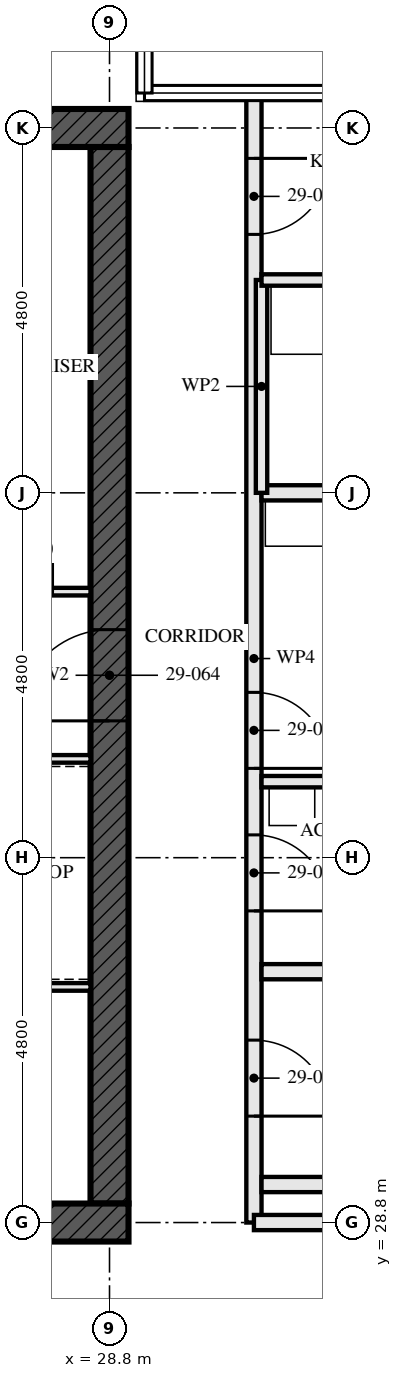
"""IFC4 building model, lengths in metres.
Left out: names, types, materials, properties, quantities, classifications, styles, units other than length and angle.
Written with IfcOpenShell. Run it as: python <this file> out.ifc"""

import sys

from ifc_helpers import new_model, si_unit, direction, frame, frame_2d, origin, place, context, subcontext, project, spatial, rectangle, extrude, element, fill, save


model = new_model("IFC4")
c1 = context("Model", 3, precision=1e-05, world=origin(), true_north=direction((0.0, 1.0)))
c2 = subcontext(c1, "Body", "Model", "MODEL_VIEW")
j1 = project(units=[si_unit("LENGTHUNIT", "METRE"), si_unit("PLANEANGLEUNIT", "RADIAN")], contexts=[c1])
p1 = place(None, origin())
s1 = spatial("IfcSite", under=j1, at=p1, CompositionType="ELEMENT")
p2 = place(p1, origin())
s2 = spatial("IfcBuilding", under=s1, at=p2, CompositionType="ELEMENT")
p3 = place(p2, frame((0.0, 0.0, 108.5)))
s3 = spatial("IfcBuildingStorey", under=s2, at=p3, CompositionType="ELEMENT", Elevation=108.5)
p4 = place(p3, frame((14.15, 28.8, -0.17), z_axis=(0.0, 0.0, 1.0), x_axis=(1.0, 0.0, 0.0)))
e1 = element("IfcWall", 1, at=p4, inside=s3, PredefinedType="SHEAR", context=c2, shape_type="SweptSolid", body=[
    extrude(rectangle(XDim=14.9, YDim=0.5, at=frame_2d((7.45, 0.0))), origin(), (0.0, 0.0, 1.0), 3.5),
])
p5 = place(p4, frame((6.85, 0.0, 0.17)))
e2 = element("IfcOpeningElement", 2, at=p5, cuts=e1, PredefinedType="OPENING", context=c2, shape_type="SweptSolid", body=[
    extrude(rectangle(XDim=1.2, YDim=2.1, at=frame_2d((0.6, 1.05))), frame((0.0, 0.26, 0.0), z_axis=(0.0, -1.0, 0.0), x_axis=(1.0, 0.0, 0.0)), (0.0, 0.0, 1.0), 0.521),
])
p6 = place(p3, frame((29.05, 43.2, -0.17), z_axis=(0.0, 0.0, 1.0), x_axis=(-1.0, 0.0, 0.0)))
e3 = element("IfcWall", 3, at=p6, inside=s3, PredefinedType="SHEAR", context=c2, shape_type="SweptSolid", body=[
    extrude(rectangle(XDim=14.9, YDim=0.5, at=frame_2d((7.45, 0.0))), origin(), (0.0, 0.0, 1.0), 3.5),
])
p7 = place(p6, frame((6.85, 0.0, 0.17)))
e4 = element("IfcOpeningElement", 4, at=p7, cuts=e3, PredefinedType="OPENING", context=c2, shape_type="SweptSolid", body=[
    extrude(rectangle(XDim=1.2, YDim=2.1, at=frame_2d((0.6, 1.05))), frame((0.0, 0.26, 0.0), z_axis=(0.0, -1.0, 0.0), x_axis=(1.0, 0.0, 0.0)), (0.0, 0.0, 1.0), 0.521),
])
p8 = place(p3, frame((28.8, 29.05, -0.17), z_axis=(0.0, 0.0, 1.0), x_axis=(0.0, 1.0, 0.0)))
e5 = element("IfcWall", 5, at=p8, inside=s3, PredefinedType="SHEAR", context=c2, shape_type="SweptSolid", body=[
    extrude(rectangle(XDim=13.9, YDim=0.5, at=frame_2d((6.95, 0.0))), origin(), (0.0, 0.0, 1.0), 3.5),
])
p9 = place(p8, frame((6.35, 0.0, 0.17)))
e6 = element("IfcOpeningElement", 6, at=p9, cuts=e5, PredefinedType="OPENING", context=c2, shape_type="SweptSolid", body=[
    extrude(rectangle(XDim=1.2, YDim=2.1, at=frame_2d((0.6, 1.05))), frame((0.0, 0.26, 0.0), z_axis=(0.0, -1.0, 0.0), x_axis=(1.0, 0.0, 0.0)), (0.0, 0.0, 1.0), 0.521),
])
for number, where, z_axis, x_axis in (
    (7, (35.5, 29.3, 0.0), (0.0, 0.0, 1.0), (-1.0, 0.0, 0.0)),
    (8, (35.5, 32.1, 0.0), (0.0, 0.0, 1.0), (-1.0, 0.0, 0.0)),
):
    element("IfcWall", number, at=place(p3, frame(where, z_axis=z_axis, x_axis=x_axis)), inside=s3, PredefinedType="SOLIDWALL", context=c2, shape_type="SweptSolid", body=[
        extrude(rectangle(XDim=4.7, YDim=0.2, at=frame_2d((2.35, 0.0))), origin(), (0.0, 0.0, 1.0), 2.99),
    ])
p10 = place(p3, frame((33.8, 34.6, 0.0), z_axis=(0.0, 0.0, 1.0), x_axis=(-1.0, 0.0, 0.0)))
e9 = element("IfcWall", 9, at=p10, inside=s3, PredefinedType="PARTITIONING", context=c2, shape_type="SweptSolid", body=[
    extrude(rectangle(XDim=3.0, YDim=0.15, at=frame_2d((1.5, 0.0))), origin(), (0.0, 0.0, 1.0), 3.33),
])
p11 = place(p3, frame((38.08, 38.4, 0.0), z_axis=(0.0, 0.0, 1.0), x_axis=(-1.0, 0.0, 0.0)))
e10 = element("IfcWall", 10, at=p11, inside=s3, PredefinedType="PARTITIONING", context=c2, shape_type="SweptSolid", body=[
    extrude(rectangle(XDim=7.28, YDim=0.2, at=frame_2d((3.64, 0.0))), origin(), (0.0, 0.0, 1.0), 2.55),
])
p12 = place(p3, frame((33.8, 41.2, 0.0), z_axis=(0.0, 0.0, 1.0), x_axis=(-1.0, 0.0, 0.0)))
e11 = element("IfcWall", 11, at=p12, inside=s3, PredefinedType="PARTITIONING", context=c2, shape_type="SweptSolid", body=[
    extrude(rectangle(XDim=3.0, YDim=0.15, at=frame_2d((1.5, 0.0))), origin(), (0.0, 0.0, 1.0), 3.33),
])
p13 = place(p3, frame((30.8, 38.4, 0.0), z_axis=(0.0, 0.0, 1.0), x_axis=(0.0, 1.0, 0.0)))
e12 = element("IfcWall", 12, at=p13, inside=s3, PredefinedType="PARTITIONING", context=c2, shape_type="SweptSolid", body=[
    extrude(rectangle(XDim=2.8, YDim=0.15, at=frame_2d((1.4, 0.0))), origin(), (0.0, 0.0, 1.0), 3.33),
])
p14 = place(p3, frame((30.7, 28.8, 0.0), z_axis=(0.0, 0.0, 1.0), x_axis=(0.0, 1.0, 0.0)))
e13 = element("IfcWall", 13, at=p14, inside=s3, PredefinedType="PARTITIONING", context=c2, shape_type="SweptSolid", body=[
    extrude(rectangle(XDim=14.84, YDim=0.2, at=frame_2d((7.42, 0.0))), origin(), (0.0, 0.0, 1.0), 2.32),
])
p15 = place(p14, frame((1.4, 0.0, 0.0)))
e14 = element("IfcOpeningElement", 14, at=p15, cuts=e13, PredefinedType="OPENING", context=c2, shape_type="SweptSolid", body=[
    extrude(rectangle(XDim=1.0, YDim=2.1, at=frame_2d((0.5, 1.05))), frame((0.0, 0.111, 0.0), z_axis=(0.0, -1.0, 0.0), x_axis=(1.0, 0.0, 0.0)), (0.0, 0.0, 1.0), 0.221),
])
p16 = place(p14, frame((4.1, 0.0, 0.0)))
e15 = element("IfcOpeningElement", 15, at=p16, cuts=e13, PredefinedType="OPENING", context=c2, shape_type="SweptSolid", body=[
    extrude(rectangle(XDim=1.0, YDim=2.1, at=frame_2d((0.5, 1.05))), frame((0.0, 0.111, 0.0), z_axis=(0.0, -1.0, 0.0), x_axis=(1.0, 0.0, 0.0)), (0.0, 0.0, 1.0), 0.221),
])
p17 = place(p14, frame((5.975, 0.0, 0.0)))
e16 = element("IfcOpeningElement", 16, at=p17, cuts=e13, PredefinedType="OPENING", context=c2, shape_type="SweptSolid", body=[
    extrude(rectangle(XDim=1.0, YDim=2.1, at=frame_2d((0.5, 1.05))), frame((0.0, 0.111, 0.0), z_axis=(0.0, -1.0, 0.0), x_axis=(1.0, 0.0, 0.0)), (0.0, 0.0, 1.0), 0.221),
])
p18 = place(p14, frame((13.0, 0.0, 0.0)))
e17 = element("IfcOpeningElement", 17, at=p18, cuts=e13, PredefinedType="OPENING", context=c2, shape_type="SweptSolid", body=[
    extrude(rectangle(XDim=1.0, YDim=2.1, at=frame_2d((0.5, 1.05))), frame((0.0, 0.111, 0.0), z_axis=(0.0, -1.0, 0.0), x_axis=(1.0, 0.0, 0.0)), (0.0, 0.0, 1.0), 0.221),
])
p19 = place(p3, frame((23.05, 34.9, 0.0), z_axis=(0.0, 0.0, 1.0), x_axis=(1.0, 0.0, 0.0)))
e18 = element("IfcWall", 18, at=p19, inside=s3, PredefinedType="SOLIDWALL", context=c2, shape_type="SweptSolid", body=[
    extrude(rectangle(XDim=5.5, YDim=0.1, at=frame_2d((2.75, 0.0))), origin(), (0.0, 0.0, 1.0), 3.33),
])
p20 = place(p3, frame((22.65, 37.1, 0.0), z_axis=(0.0, 0.0, 1.0), x_axis=(1.0, 0.0, 0.0)))
e19 = element("IfcWall", 19, at=p20, inside=s3, PredefinedType="SOLIDWALL", context=c2, shape_type="SweptSolid", body=[
    extrude(rectangle(XDim=5.9, YDim=0.1, at=frame_2d((2.95, 0.0))), origin(), (0.0, 0.0, 1.0), 3.33),
])
p21 = place(p20, frame((3.15, 0.0, 0.0)))
e20 = element("IfcOpeningElement", 20, at=p21, cuts=e19, PredefinedType="OPENING", context=c2, shape_type="SweptSolid", body=[
    extrude(rectangle(XDim=0.9, YDim=2.1, at=frame_2d((0.45, 1.05))), frame((0.0, 0.061, 0.0), z_axis=(0.0, -1.0, 0.0), x_axis=(1.0, 0.0, 0.0)), (0.0, 0.0, 1.0), 0.121),
])
p22 = place(p20, frame((4.7, 0.0, 0.0)))
e21 = element("IfcOpeningElement", 21, at=p22, cuts=e19, PredefinedType="OPENING", context=c2, shape_type="SweptSolid", body=[
    extrude(rectangle(XDim=0.7, YDim=2.1, at=frame_2d((0.35, 1.05))), frame((0.0, 0.061, 0.0), z_axis=(0.0, -1.0, 0.0), x_axis=(1.0, 0.0, 0.0)), (0.0, 0.0, 1.0), 0.121),
])
p23 = place(p3, frame((23.15, 31.9, 0.0), z_axis=(0.0, 0.0, 1.0), x_axis=(1.0, 0.0, 0.0)))
e22 = element("IfcWall", 22, at=p23, inside=s3, PredefinedType="SOLIDWALL", context=c2, shape_type="SweptSolid", body=[
    extrude(rectangle(XDim=5.4, YDim=0.1, at=frame_2d((2.7, 0.0))), origin(), (0.0, 0.0, 1.0), 3.33),
])
p24 = place(p3, frame((33.255, 28.8, 0.0), z_axis=(0.0, 0.0, 1.0), x_axis=(-1.0, 0.0, 0.0)))
e23 = element("IfcWall", 23, at=p24, inside=s3, PredefinedType="PARTITIONING", context=c2, shape_type="SweptSolid", body=[
    extrude(rectangle(XDim=2.555, YDim=0.2, at=frame_2d((1.277, 0.0))), origin(), (0.0, 0.0, 1.0), 2.32),
])
p25 = place(p15, frame((1.0, 0.0, 0.0), z_axis=(0.0, 0.0, 1.0), x_axis=(-1.0, 0.0, 0.0)))
e24 = element("IfcDoor", 24, at=p25, inside=s3, OperationType="SINGLE_SWING_LEFT", PredefinedType="DOOR", context=c2, shape_type="SweptSolid", body=[
    extrude(rectangle(XDim=1.0, YDim=2.1, at=frame_2d((0.5, 1.05))), frame((0.0, 0.032, 0.0), z_axis=(0.0, -1.0, 0.0), x_axis=(1.0, 0.0, 0.0)), (0.0, 0.0, 1.0), 0.064),
])
fill(e14, e24)
p26 = place(p16, frame((1.0, 0.0, 0.0), z_axis=(0.0, 0.0, 1.0), x_axis=(-1.0, 0.0, 0.0)))
e25 = element("IfcDoor", 25, at=p26, inside=s3, OperationType="SINGLE_SWING_LEFT", PredefinedType="DOOR", context=c2, shape_type="SweptSolid", body=[
    extrude(rectangle(XDim=1.0, YDim=2.1, at=frame_2d((0.5, 1.05))), frame((0.0, 0.027, 0.0), z_axis=(0.0, -1.0, 0.0), x_axis=(1.0, 0.0, 0.0)), (0.0, 0.0, 1.0), 0.054),
])
fill(e15, e25)
p27 = place(p17, frame((1.0, 0.0, 0.0), z_axis=(0.0, 0.0, 1.0), x_axis=(-1.0, 0.0, 0.0)))
e26 = element("IfcDoor", 26, at=p27, inside=s3, OperationType="SINGLE_SWING_LEFT", PredefinedType="DOOR", context=c2, shape_type="SweptSolid", body=[
    extrude(rectangle(XDim=1.0, YDim=2.1, at=frame_2d((0.5, 1.05))), frame((0.0, 0.027, 0.0), z_axis=(0.0, -1.0, 0.0), x_axis=(1.0, 0.0, 0.0)), (0.0, 0.0, 1.0), 0.054),
])
fill(e16, e26)
p28 = place(p18, frame((1.0, 0.0, 0.0), z_axis=(0.0, 0.0, 1.0), x_axis=(-1.0, 0.0, 0.0)))
e27 = element("IfcDoor", 27, at=p28, inside=s3, OperationType="SINGLE_SWING_RIGHT", PredefinedType="DOOR", context=c2, shape_type="SweptSolid", body=[
    extrude(rectangle(XDim=1.0, YDim=2.1, at=frame_2d((0.5, 1.05))), frame((0.0, 0.027, 0.0), z_axis=(0.0, -1.0, 0.0), x_axis=(1.0, 0.0, 0.0)), (0.0, 0.0, 1.0), 0.054),
])
fill(e17, e27)
p29 = place(p9, origin())
e28 = element("IfcDoor", 28, at=p29, inside=s3, OperationType="SINGLE_SWING_LEFT", PredefinedType="DOOR", context=c2, shape_type="SweptSolid", body=[
    extrude(rectangle(XDim=1.2, YDim=2.1, at=frame_2d((0.6, 1.05))), frame((0.0, 0.027, 0.0), z_axis=(0.0, -1.0, 0.0), x_axis=(1.0, 0.0, 0.0)), (0.0, 0.0, 1.0), 0.054),
])
fill(e6, e28)
save(model, sys.argv[1])
